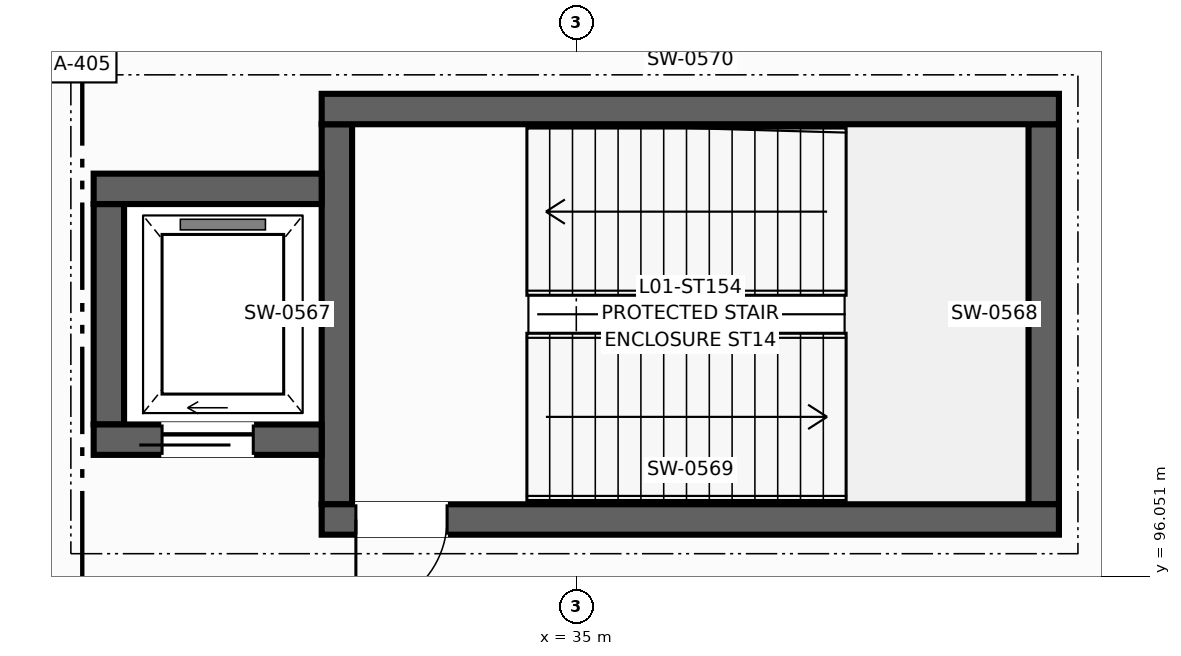
"""IFC4 building model, lengths in metres.
Left out: names, types, materials, properties, quantities, classifications, styles, units other than length and angle.
Written with IfcOpenShell. Run it as: python <this file> out.ifc"""

import sys

from ifc_helpers import new_model, si_unit, direction, frame, frame_2d, origin, place, context, subcontext, project, spatial, rectangle, extrude, element, fill, save


model = new_model("IFC4")
c1 = context("Model", 3, precision=1e-05, world=origin(), true_north=direction((0.0, 1.0)))
c2 = subcontext(c1, "Body", "Model", "MODEL_VIEW")
j1 = project(units=[si_unit("LENGTHUNIT", "METRE"), si_unit("PLANEANGLEUNIT", "RADIAN")], contexts=[c1])
p1 = place(None, origin())
s1 = spatial("IfcSite", under=j1, at=p1, CompositionType="ELEMENT")
p2 = place(p1, origin())
s2 = spatial("IfcBuilding", under=s1, at=p2, CompositionType="ELEMENT")
p3 = place(p2, frame((0.0, 0.0, 4.5)))
s3 = spatial("IfcBuildingStorey", under=s2, at=p3, CompositionType="ELEMENT", Elevation=4.5)
for number, where, z_axis, x_axis in (
    (1, (31.85, 97.0, 0.0), (0.0, 0.0, 1.0), (0.0, 1.0, 0.0)),
    (2, (41.15, 97.0, 0.0), (0.0, 0.0, 1.0), (0.0, 1.0, 0.0)),
):
    element("IfcWall", number, at=place(p3, frame(where, z_axis=z_axis, x_axis=x_axis)), inside=s3, PredefinedType="SHEAR", context=c2, shape_type="SweptSolid", body=[
        extrude(rectangle(XDim=5.0, YDim=0.4, at=frame_2d((2.5, 0.0))), origin(), (0.0, 0.0, 1.0), 4.29),
    ])
p4 = place(p3, frame((31.65, 96.8, 0.0), z_axis=(0.0, 0.0, 1.0), x_axis=(1.0, 0.0, 0.0)))
e3 = element("IfcWall", 3, at=p4, inside=s3, PredefinedType="SHEAR", context=c2, shape_type="SweptSolid", body=[
    extrude(rectangle(XDim=9.7, YDim=0.4, at=frame_2d((4.85, 0.0))), origin(), (0.0, 0.0, 1.0), 4.29),
])
p5 = place(p4, frame((0.45, 0.0, 0.0)))
e4 = element("IfcOpeningElement", 4, at=p5, cuts=e3, PredefinedType="OPENING", context=c2, shape_type="SweptSolid", body=[
    extrude(rectangle(XDim=1.2, YDim=2.2, at=frame_2d((0.6, 1.1))), frame((0.0, 0.21, 0.0), z_axis=(0.0, -1.0, 0.0), x_axis=(1.0, 0.0, 0.0)), (0.0, 0.0, 1.0), 0.42),
])
p6 = place(p3, frame((31.65, 102.2, 0.0), z_axis=(0.0, 0.0, 1.0), x_axis=(1.0, 0.0, 0.0)))
e5 = element("IfcWall", 5, at=p6, inside=s3, PredefinedType="SHEAR", context=c2, shape_type="SweptSolid", body=[
    extrude(rectangle(XDim=9.7, YDim=0.4, at=frame_2d((4.85, 0.0))), origin(), (0.0, 0.0, 1.0), 4.29),
])
p7 = place(p3, frame((28.85, 98.05, 0.0), z_axis=(0.0, 0.0, 1.0), x_axis=(0.0, 1.0, 0.0)))
e6 = element("IfcWall", 6, at=p7, inside=s3, PredefinedType="SHEAR", context=c2, shape_type="SweptSolid", body=[
    extrude(rectangle(XDim=2.9, YDim=0.4, at=frame_2d((1.45, 0.0))), origin(), (0.0, 0.0, 1.0), 4.29),
])
p8 = place(p3, frame((28.65, 97.85, 0.0), z_axis=(0.0, 0.0, 1.0), x_axis=(1.0, 0.0, 0.0)))
e7 = element("IfcWall", 7, at=p8, inside=s3, PredefinedType="SHEAR", context=c2, shape_type="SweptSolid", body=[
    extrude(rectangle(XDim=3.0, YDim=0.4, at=frame_2d((1.5, 0.0))), origin(), (0.0, 0.0, 1.0), 4.29),
])
p9 = place(p8, frame((0.9, 0.0, 0.0)))
e8 = element("IfcOpeningElement", 8, at=p9, cuts=e7, PredefinedType="OPENING", context=c2, shape_type="SweptSolid", body=[
    extrude(rectangle(XDim=1.2, YDim=2.2, at=frame_2d((0.6, 1.1))), frame((0.0, 0.21, 0.0), z_axis=(0.0, -1.0, 0.0), x_axis=(1.0, 0.0, 0.0)), (0.0, 0.0, 1.0), 0.42),
])
p10 = place(p3, frame((28.65, 101.15, 0.0), z_axis=(0.0, 0.0, 1.0), x_axis=(1.0, 0.0, 0.0)))
e9 = element("IfcWall", 9, at=p10, inside=s3, PredefinedType="SHEAR", context=c2, shape_type="SweptSolid", body=[
    extrude(rectangle(XDim=3.0, YDim=0.4, at=frame_2d((1.5, 0.0))), origin(), (0.0, 0.0, 1.0), 4.29),
])
p11 = place(p5, frame((1.2, 0.0, 0.0), z_axis=(0.0, 0.0, 1.0), x_axis=(-1.0, 0.0, 0.0)))
e10 = element("IfcDoor", 10, at=p11, inside=s3, OperationType="SINGLE_SWING_LEFT", PredefinedType="DOOR", context=c2, shape_type="SweptSolid", body=[
    extrude(rectangle(XDim=1.2, YDim=2.2, at=frame_2d((0.6, 1.1))), frame((0.0, 0.025, 0.0), z_axis=(0.0, -1.0, 0.0), x_axis=(1.0, 0.0, 0.0)), (0.0, 0.0, 1.0), 0.05),
])
fill(e4, e10)
p12 = place(p9, origin())
e11 = element("IfcDoor", 11, at=p12, inside=s3, OperationType="SLIDING_TO_LEFT", PredefinedType="DOOR", context=c2, shape_type="SweptSolid", body=[
    extrude(rectangle(XDim=1.2, YDim=2.2, at=frame_2d((0.6, 1.1))), frame((0.0, 0.025, 0.0), z_axis=(0.0, -1.0, 0.0), x_axis=(1.0, 0.0, 0.0)), (0.0, 0.0, 1.0), 0.05),
])
fill(e8, e11)
save(model, sys.argv[1])
